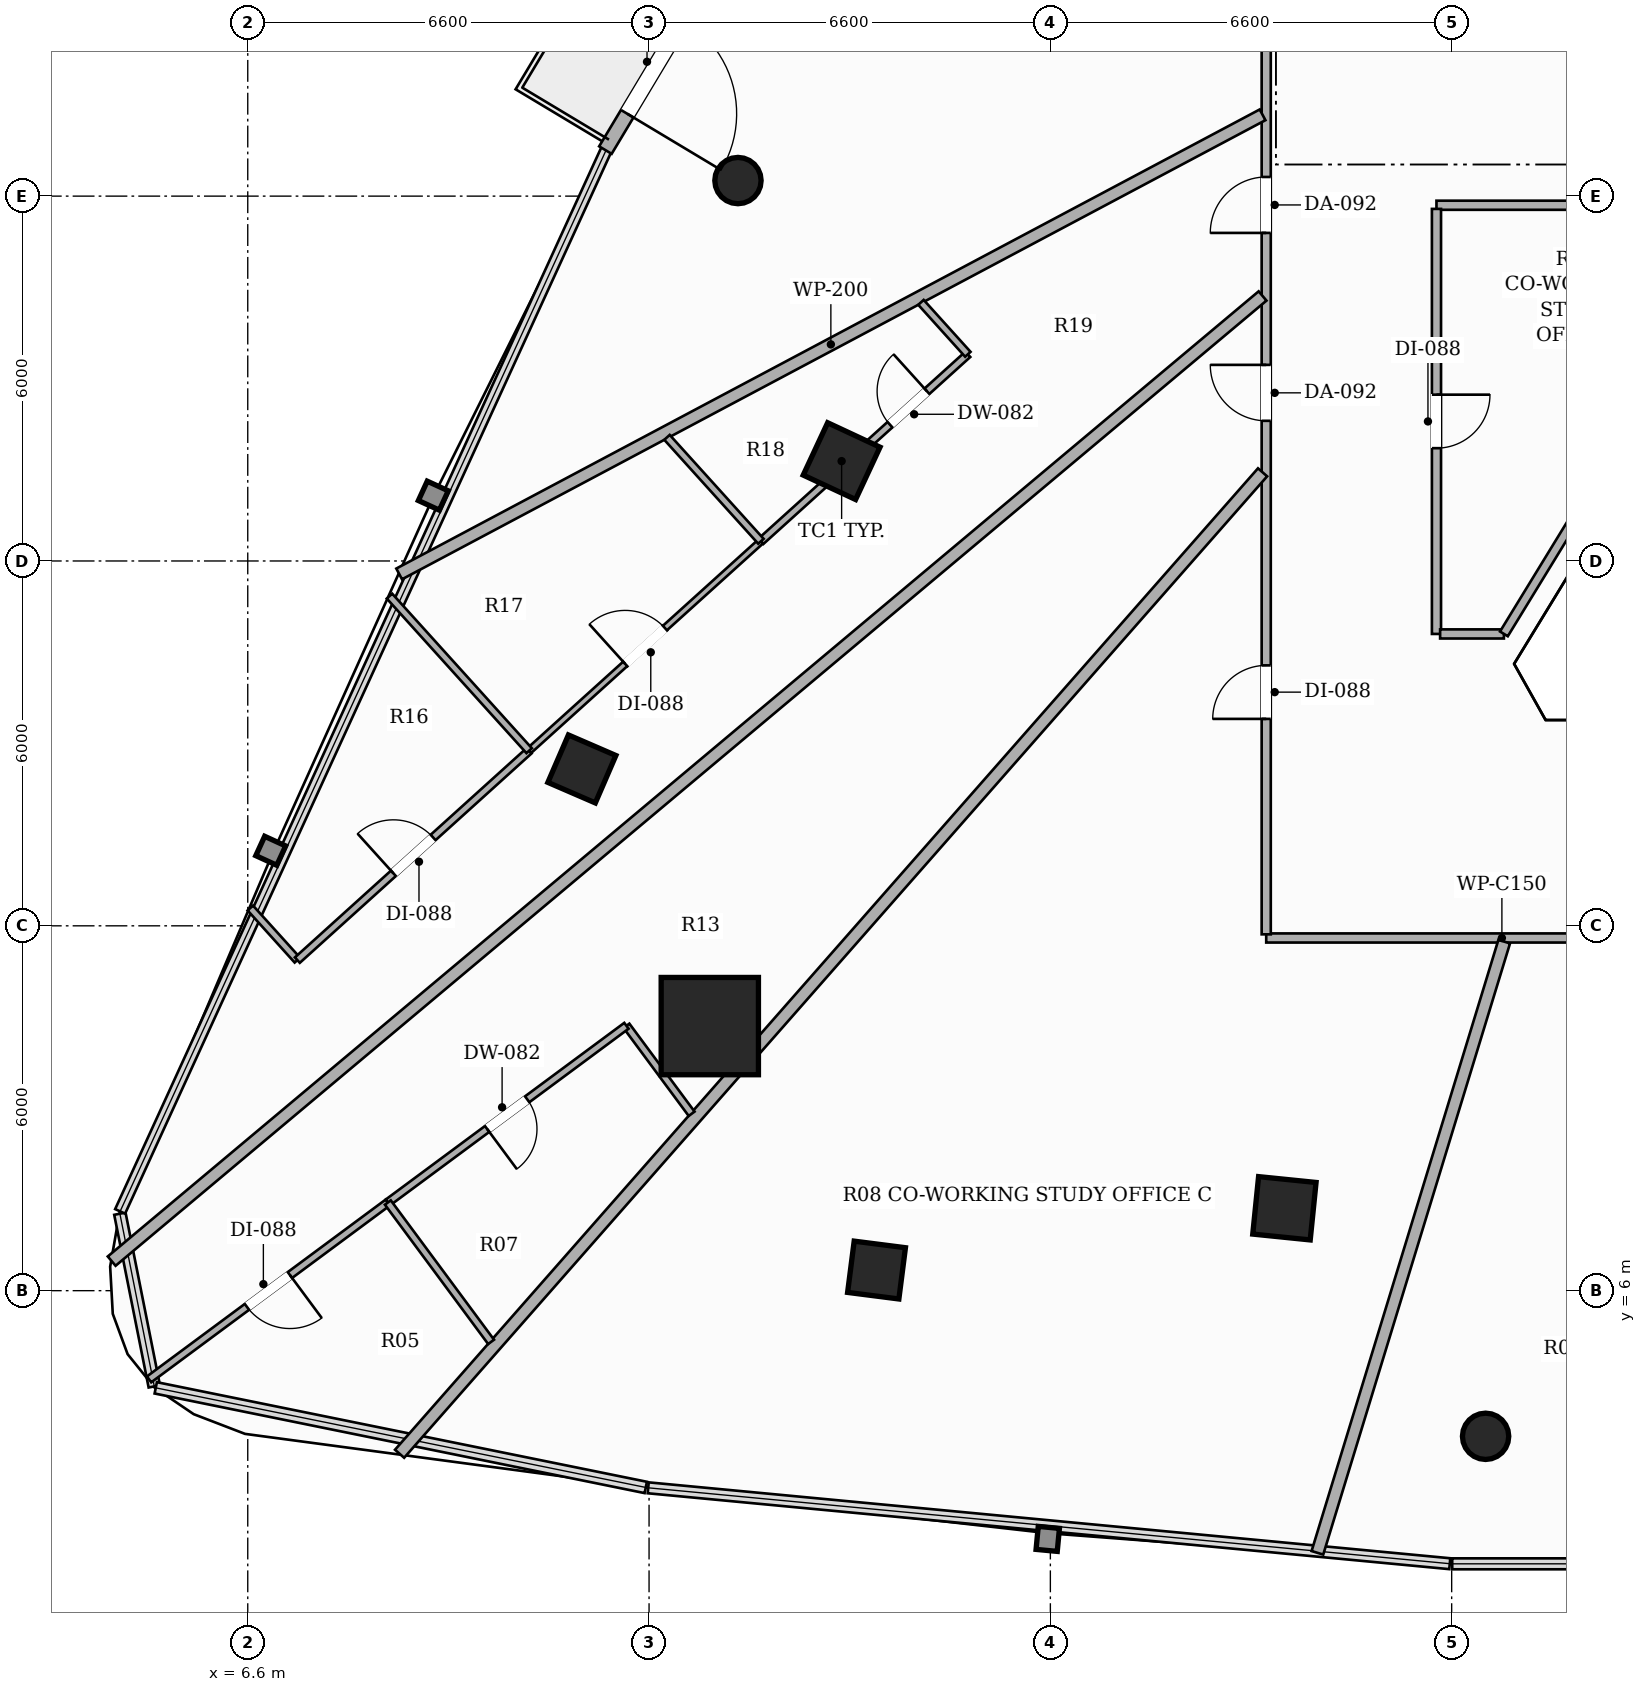
"""IFC4 building model, lengths in metres.
Left out: names, types, materials, properties, quantities, classifications, styles, units other than length and angle.
Written with IfcOpenShell. Run it as: python <this file> out.ifc"""

import sys

from ifc_helpers import new_model, si_unit, direction, frame, frame_2d, origin, origin_2d, place, context, subcontext, project, spatial, rectangle, hollow_rectangle, hollow_circle, extrude, element, fill, save


model = new_model("IFC4")
c1 = context("Model", 3, precision=1e-05, world=origin(), true_north=direction((0.0, 1.0)))
c2 = subcontext(c1, "Body", "Model", "MODEL_VIEW")
j1 = project(units=[si_unit("LENGTHUNIT", "METRE"), si_unit("PLANEANGLEUNIT", "RADIAN")], contexts=[c1])
p1 = place(None, origin())
s1 = spatial("IfcSite", under=j1, at=p1, CompositionType="ELEMENT")
p2 = place(p1, origin())
s2 = spatial("IfcBuilding", under=s1, at=p2, CompositionType="ELEMENT")
p3 = place(p2, frame((0.0, 0.0, 46.7)))
s3 = spatial("IfcBuildingStorey", under=s2, at=p3, CompositionType="ELEMENT", Elevation=46.7)
p4 = place(p3, frame((14.199, 10.351, 0.0), z_axis=(0.0, 0.0, 1.0), x_axis=(1.0, 0.0, 0.0)))
e1 = element("IfcColumn", 1, at=p4, inside=s3, PredefinedType="COLUMN", context=c2, shape_type="SweptSolid", body=[
    extrude(hollow_rectangle(XDim=1.6, YDim=1.6, WallThickness=0.05, at=origin_2d()), origin(), (0.0, 0.0, 1.0), 3.3),
])
for number, where, z_axis, x_axis in (
    (2, (16.367, 19.642, 0.0), (0.0, 0.0, 1.0), (0.423, 0.906, 0.0)),
    (3, (23.649, 7.355, 0.0), (0.0, 0.0, 1.0), (-0.995, 0.101, 0.0)),
):
    element("IfcColumn", number, at=place(p3, frame(where, z_axis=z_axis, x_axis=x_axis)), inside=s3, PredefinedType="COLUMN", context=c2, shape_type="SweptSolid", body=[
        extrude(hollow_rectangle(XDim=0.95, YDim=0.95, WallThickness=0.032, at=origin_2d()), origin(), (0.0, 0.0, 1.0), 3.3),
    ])
for number, where, z_axis, x_axis in (
    (4, (12.095, 14.58, 0.0), (0.0, 0.0, 1.0), (0.397, 0.918, 0.0)),
    (5, (16.941, 6.339, 0.0), (0.0, 0.0, 1.0), (-0.992, 0.127, 0.0)),
):
    element("IfcColumn", number, at=place(p3, frame(where, z_axis=z_axis, x_axis=x_axis)), inside=s3, PredefinedType="COLUMN", context=c2, shape_type="SweptSolid", body=[
        extrude(hollow_rectangle(XDim=0.85, YDim=0.85, WallThickness=0.028, at=origin_2d()), origin(), (0.0, 0.0, 1.0), 3.3),
    ])
for number, where, z_axis, x_axis in (
    (6, (14.662, 24.256, 0.0), (0.0, 0.0, 1.0), (1.0, 0.0, 0.0)),
    (7, (26.958, 3.605, 0.0), (0.0, 0.0, 1.0), (1.0, 0.0, 0.0)),
):
    element("IfcColumn", number, at=place(p3, frame(where, z_axis=z_axis, x_axis=x_axis)), inside=s3, PredefinedType="COLUMN", context=c2, shape_type="SweptSolid", body=[
        extrude(hollow_circle(Radius=0.381, WallThickness=0.022, at=origin_2d()), origin(), (0.0, 0.0, 1.0), 3.3),
    ])
p5 = place(p3, frame((19.162, 35.896, 0.0), z_axis=(0.0, 0.0, 1.0), x_axis=(-0.514316069528, -0.857600711652, 0.0)))
e8 = element("IfcWall", 8, at=p5, inside=s3, PredefinedType="SOLIDWALL", context=c2, shape_type="SweptSolid", body=[
    extrude(rectangle(XDim=12.989, YDim=0.24, at=frame_2d((6.494, 0.0))), origin(), (0.0, 0.0, 1.0), 2.624),
])
p6 = place(p5, frame((10.491, 0.0, 0.0)))
e9 = element("IfcOpeningElement", 9, at=p6, cuts=e8, PredefinedType="OPENING", context=c2, shape_type="SweptSolid", body=[
    extrude(rectangle(XDim=1.8, YDim=2.2, at=frame_2d((0.9, 1.1))), frame((0.0, 0.13, 0.0), z_axis=(0.0, -1.0, 0.0), x_axis=(1.0, 0.0, 0.0)), (0.0, 0.0, 1.0), 0.26),
])
p7 = place(p3, frame((42.59, 11.8, 0.0), z_axis=(0.0, 0.0, 1.0), x_axis=(-1.0, 0.0, 0.0)))
e10 = element("IfcWall", 10, at=p7, inside=s3, PredefinedType="PARTITIONING", context=c2, shape_type="SweptSolid", body=[
    extrude(rectangle(XDim=19.24, YDim=0.15, at=frame_2d((9.62, 0.0))), origin(), (0.0, 0.0, 1.0), 2.669),
])
p8 = place(p7, frame((10.508, 0.0, 0.0)))
e11 = element("IfcOpeningElement", 11, at=p8, cuts=e10, PredefinedType="OPENING", context=c2, shape_type="SweptSolid", body=[
    extrude(rectangle(XDim=0.88, YDim=2.1, at=frame_2d((0.44, 1.05))), frame((0.0, 0.085, 0.0), z_axis=(0.0, -1.0, 0.0), x_axis=(1.0, 0.0, 0.0)), (0.0, 0.0, 1.0), 0.17),
])
p9 = place(p7, frame((2.98, 0.0, 0.0)))
e12 = element("IfcOpeningElement", 12, at=p9, cuts=e10, PredefinedType="OPENING", context=c2, shape_type="SweptSolid", body=[
    extrude(rectangle(XDim=0.92, YDim=2.15, at=frame_2d((0.46, 1.075))), frame((0.0, 0.085, 0.0), z_axis=(0.0, -1.0, 0.0), x_axis=(1.0, 0.0, 0.0)), (0.0, 0.0, 1.0), 0.17),
])
p10 = place(p3, frame((23.35, 11.86, 0.0), z_axis=(0.0, 0.0, 1.0), x_axis=(0.0, 1.0, 0.0)))
e13 = element("IfcWall", 13, at=p10, inside=s3, PredefinedType="PARTITIONING", context=c2, shape_type="SweptSolid", body=[
    extrude(rectangle(XDim=25.04, YDim=0.15, at=frame_2d((12.52, 0.0))), origin(), (0.0, 0.0, 1.0), 2.413),
])
p11 = place(p10, frame((18.67, 0.0, 0.0)))
e14 = element("IfcOpeningElement", 14, at=p11, cuts=e13, PredefinedType="OPENING", context=c2, shape_type="SweptSolid", body=[
    extrude(rectangle(XDim=0.88, YDim=2.1, at=frame_2d((0.44, 1.05))), frame((0.0, 0.085, 0.0), z_axis=(0.0, -1.0, 0.0), x_axis=(1.0, 0.0, 0.0)), (0.0, 0.0, 1.0), 0.17),
])
p12 = place(p10, frame((3.543, 0.0, 0.0)))
e15 = element("IfcOpeningElement", 15, at=p12, cuts=e13, PredefinedType="OPENING", context=c2, shape_type="SweptSolid", body=[
    extrude(rectangle(XDim=0.88, YDim=2.1, at=frame_2d((0.44, 1.05))), frame((0.0, 0.085, 0.0), z_axis=(0.0, -1.0, 0.0), x_axis=(1.0, 0.0, 0.0)), (0.0, 0.0, 1.0), 0.17),
])
p13 = place(p10, frame((8.445, 0.0, 0.0)))
e16 = element("IfcOpeningElement", 16, at=p13, cuts=e13, PredefinedType="OPENING", context=c2, shape_type="SweptSolid", body=[
    extrude(rectangle(XDim=0.92, YDim=2.15, at=frame_2d((0.46, 1.075))), frame((0.0, 0.085, 0.0), z_axis=(0.0, -1.0, 0.0), x_axis=(1.0, 0.0, 0.0)), (0.0, 0.0, 1.0), 0.17),
])
p14 = place(p10, frame((11.535, 0.0, 0.0)))
e17 = element("IfcOpeningElement", 17, at=p14, cuts=e13, PredefinedType="OPENING", context=c2, shape_type="SweptSolid", body=[
    extrude(rectangle(XDim=0.92, YDim=2.15, at=frame_2d((0.46, 1.075))), frame((0.0, 0.085, 0.0), z_axis=(0.0, -1.0, 0.0), x_axis=(1.0, 0.0, 0.0)), (0.0, 0.0, 1.0), 0.17),
])
p15 = place(p3, frame((31.568, 23.85, 0.0), z_axis=(0.0, 0.0, 1.0), x_axis=(-1.0, 0.0, 0.0)))
e18 = element("IfcWall", 18, at=p15, inside=s3, PredefinedType="PARTITIONING", context=c2, shape_type="SweptSolid", body=[
    extrude(rectangle(XDim=5.418, YDim=0.15, at=frame_2d((2.709, 0.0))), origin(), (0.0, 0.0, 1.0), 2.669),
])
p16 = place(p3, frame((26.15, 23.79, 0.0), z_axis=(0.0, 0.0, 1.0), x_axis=(0.0, -1.0, 0.0)))
e19 = element("IfcWall", 19, at=p16, inside=s3, PredefinedType="PARTITIONING", context=c2, shape_type="SweptSolid", body=[
    extrude(rectangle(XDim=6.99, YDim=0.15, at=frame_2d((3.495, 0.0))), origin(), (0.0, 0.0, 1.0), 2.669),
])
p17 = place(p16, frame((3.055, 0.0, 0.0)))
e20 = element("IfcOpeningElement", 20, at=p17, cuts=e19, PredefinedType="OPENING", context=c2, shape_type="SweptSolid", body=[
    extrude(rectangle(XDim=0.88, YDim=2.1, at=frame_2d((0.44, 1.05))), frame((0.0, 0.085, 0.0), z_axis=(0.0, -1.0, 0.0), x_axis=(1.0, 0.0, 0.0)), (0.0, 0.0, 1.0), 0.17),
])
p18 = place(p3, frame((26.21, 16.8, 0.0), z_axis=(0.0, 0.0, 1.0), x_axis=(1.0, 0.0, 0.0)))
e21 = element("IfcWall", 21, at=p18, inside=s3, PredefinedType="PARTITIONING", context=c2, shape_type="SweptSolid", body=[
    extrude(rectangle(XDim=1.049, YDim=0.15, at=frame_2d((0.524, 0.0))), origin(), (0.0, 0.0, 1.0), 3.06),
])
p19 = place(p3, frame((27.259, 16.801, 0.0), z_axis=(0.0, 0.0, 1.0), x_axis=(0.522072924527, 0.852900850906, 0.0)))
e22 = element("IfcWall", 22, at=p19, inside=s3, PredefinedType="PARTITIONING", context=c2, shape_type="SweptSolid", body=[
    extrude(rectangle(XDim=8.194, YDim=0.15, at=frame_2d((4.097, 0.0))), origin(), (0.0, 0.0, 1.0), 2.669),
])
p20 = place(p3, frame((23.29, 25.337, 0.0), z_axis=(0.0, 0.0, 1.0), x_axis=(-0.882959018112, -0.469450074379, 0.0)))
e23 = element("IfcWall", 23, at=p20, inside=s3, PredefinedType="PARTITIONING", context=c2, shape_type="SweptSolid", body=[
    extrude(rectangle(XDim=16.082, YDim=0.2, at=frame_2d((8.041, 0.0))), origin(), (0.0, 0.0, 1.0), 2.413),
])
p21 = place(p3, frame((27.264, 11.74, 0.0), z_axis=(0.0, 0.0, 1.0), x_axis=(-0.292294665238, -0.956328305904, 0.0)))
e24 = element("IfcWall", 24, at=p21, inside=s3, PredefinedType="PARTITIONING", context=c2, shape_type="SweptSolid", body=[
    extrude(rectangle(XDim=10.51, YDim=0.2, at=frame_2d((5.255, 0.0))), origin(), (0.0, 0.0, 1.0), 2.413),
])
p22 = place(p3, frame((9.097, 3.318, 0.0), z_axis=(0.0, 0.0, 1.0), x_axis=(0.66036589704, 0.750943993935, 0.0)))
e25 = element("IfcWall", 25, at=p22, inside=s3, PredefinedType="PARTITIONING", context=c2, shape_type="SweptSolid", body=[
    extrude(rectangle(XDim=21.493, YDim=0.2, at=frame_2d((10.747, 0.0))), origin(), (0.0, 0.0, 1.0), 2.413),
])
p23 = place(p3, frame((4.362, 6.486, 0.0), z_axis=(0.0, 0.0, 1.0), x_axis=(0.766256370513, 0.642534959865, 0.0)))
e26 = element("IfcWall", 26, at=p23, inside=s3, PredefinedType="PARTITIONING", context=c2, shape_type="SweptSolid", body=[
    extrude(rectangle(XDim=24.702, YDim=0.2, at=frame_2d((12.351, 0.0))), origin(), (0.0, 0.0, 1.0), 2.413),
])
p24 = place(p3, frame((13.9, 8.909, 0.0), z_axis=(0.0, 0.0, 1.0), x_axis=(-0.595282665334, 0.803516364708, 0.0)))
e27 = element("IfcWall", 27, at=p24, inside=s3, PredefinedType="PARTITIONING", context=c2, shape_type="SweptSolid", body=[
    extrude(rectangle(XDim=1.801, YDim=0.12, at=frame_2d((0.9, 0.0))), origin(), (0.0, 0.0, 1.0), 3.06),
])
p25 = place(p3, frame((12.828, 10.356, 0.0), z_axis=(0.0, 0.0, 1.0), x_axis=(-0.803609449498, -0.595156998344, 0.0)))
e28 = element("IfcWall", 28, at=p25, inside=s3, PredefinedType="PARTITIONING", context=c2, shape_type="SweptSolid", body=[
    extrude(rectangle(XDim=4.883, YDim=0.12, at=frame_2d((2.441, 0.0))), origin(), (0.0, 0.0, 1.0), 2.619),
])
p26 = place(p25, frame((2.031, 0.0, 0.0)))
e29 = element("IfcOpeningElement", 29, at=p26, cuts=e28, PredefinedType="OPENING", context=c2, shape_type="SweptSolid", body=[
    extrude(rectangle(XDim=0.82, YDim=2.1, at=frame_2d((0.41, 1.05))), frame((0.0, 0.07, 0.0), z_axis=(0.0, -1.0, 0.0), x_axis=(1.0, 0.0, 0.0)), (0.0, 0.0, 1.0), 0.14),
])
p27 = place(p3, frame((8.904, 7.45, 0.0), z_axis=(0.0, 0.0, 1.0), x_axis=(-0.803552768464, -0.595233524168, 0.0)))
e30 = element("IfcWall", 30, at=p27, inside=s3, PredefinedType="PARTITIONING", context=c2, shape_type="SweptSolid", body=[
    extrude(rectangle(XDim=4.887, YDim=0.12, at=frame_2d((2.443, 0.0))), origin(), (0.0, 0.0, 1.0), 3.06),
])
p28 = place(p27, frame((2.004, 0.0, 0.0)))
e31 = element("IfcOpeningElement", 31, at=p28, cuts=e30, PredefinedType="OPENING", context=c2, shape_type="SweptSolid", body=[
    extrude(rectangle(XDim=0.88, YDim=2.1, at=frame_2d((0.44, 1.05))), frame((0.0, 0.07, 0.0), z_axis=(0.0, -1.0, 0.0), x_axis=(1.0, 0.0, 0.0)), (0.0, 0.0, 1.0), 0.14),
])
p29 = place(p3, frame((10.602, 5.158, 0.0), z_axis=(0.0, 0.0, 1.0), x_axis=(-0.595278721497, 0.803519286472, 0.0)))
e32 = element("IfcWall", 32, at=p29, inside=s3, PredefinedType="PARTITIONING", context=c2, shape_type="SweptSolid", body=[
    extrude(rectangle(XDim=2.853, YDim=0.12, at=frame_2d((1.426, 0.0))), origin(), (0.0, 0.0, 1.0), 3.06),
])
p30 = place(p3, frame((15.04, 18.324, 0.0), z_axis=(0.0, 0.0, 1.0), x_axis=(0.741971948415, 0.670430926916, 0.0)))
e33 = element("IfcWall", 33, at=p30, inside=s3, PredefinedType="PARTITIONING", context=c2, shape_type="SweptSolid", body=[
    extrude(rectangle(XDim=4.586, YDim=0.12, at=frame_2d((2.293, 0.0))), origin(), (0.0, 0.0, 1.0), 2.413),
])
p31 = place(p30, frame((2.86, 0.0, 0.0)))
e34 = element("IfcOpeningElement", 34, at=p31, cuts=e33, PredefinedType="OPENING", context=c2, shape_type="SweptSolid", body=[
    extrude(rectangle(XDim=0.82, YDim=2.1, at=frame_2d((0.41, 1.05))), frame((0.0, 0.07, 0.0), z_axis=(0.0, -1.0, 0.0), x_axis=(1.0, 0.0, 0.0)), (0.0, 0.0, 1.0), 0.14),
])
p32 = place(p3, frame((18.443, 21.399, 0.0), z_axis=(0.0, 0.0, 1.0), x_axis=(-0.670112835353, 0.742259245746, 0.0)))
e35 = element("IfcWall", 35, at=p32, inside=s3, PredefinedType="PARTITIONING", context=c2, shape_type="SweptSolid", body=[
    extrude(rectangle(XDim=1.151, YDim=0.12, at=frame_2d((0.575, 0.0))), origin(), (0.0, 0.0, 1.0), 2.669),
])
p33 = place(p3, frame((6.642, 12.293, 0.0), z_axis=(0.0, 0.0, 1.0), x_axis=(0.670248695606, -0.742136568321, 0.0)))
e36 = element("IfcWall", 36, at=p33, inside=s3, PredefinedType="PARTITIONING", context=c2, shape_type="SweptSolid", body=[
    extrude(rectangle(XDim=1.155, YDim=0.12, at=frame_2d((0.577, 0.0))), origin(), (0.0, 0.0, 1.0), 2.619),
])
p34 = place(p3, frame((7.416, 11.436, 0.0), z_axis=(0.0, 0.0, 1.0), x_axis=(0.742030958457, 0.670365614192, 0.0)))
e37 = element("IfcWall", 37, at=p34, inside=s3, PredefinedType="PARTITIONING", context=c2, shape_type="SweptSolid", body=[
    extrude(rectangle(XDim=5.137, YDim=0.12, at=frame_2d((2.569, 0.0))), origin(), (0.0, 0.0, 1.0), 2.619),
])
p35 = place(p34, frame((2.129, 0.0, 0.0)))
e38 = element("IfcOpeningElement", 38, at=p35, cuts=e37, PredefinedType="OPENING", context=c2, shape_type="SweptSolid", body=[
    extrude(rectangle(XDim=0.88, YDim=2.1, at=frame_2d((0.44, 1.05))), frame((0.0, 0.07, 0.0), z_axis=(0.0, -1.0, 0.0), x_axis=(1.0, 0.0, 0.0)), (0.0, 0.0, 1.0), 0.14),
])
p36 = place(p3, frame((11.228, 14.88, 0.0), z_axis=(0.0, 0.0, 1.0), x_axis=(0.742007319068, 0.670391779819, 0.0)))
e39 = element("IfcWall", 39, at=p36, inside=s3, PredefinedType="PARTITIONING", context=c2, shape_type="SweptSolid", body=[
    extrude(rectangle(XDim=5.137, YDim=0.1, at=frame_2d((2.569, 0.0))), origin(), (0.0, 0.0, 1.0), 2.413),
])
p37 = place(p36, frame((2.129, 0.0, 0.0)))
e40 = element("IfcOpeningElement", 40, at=p37, cuts=e39, PredefinedType="OPENING", context=c2, shape_type="SweptSolid", body=[
    extrude(rectangle(XDim=0.88, YDim=2.1, at=frame_2d((0.44, 1.05))), frame((0.0, 0.06, 0.0), z_axis=(0.0, -1.0, 0.0), x_axis=(1.0, 0.0, 0.0)), (0.0, 0.0, 1.0), 0.12),
])
p38 = place(p3, frame((15.04, 18.324, 0.0), z_axis=(0.0, 0.0, 1.0), x_axis=(-0.670602478911, 0.741816901451, 0.0)))
e41 = element("IfcWall", 41, at=p38, inside=s3, PredefinedType="PARTITIONING", context=c2, shape_type="SweptSolid", body=[
    extrude(rectangle(XDim=2.304, YDim=0.12, at=frame_2d((1.152, 0.0))), origin(), (0.0, 0.0, 1.0), 2.413),
])
p39 = place(p3, frame((8.931, 17.422, 0.0), z_axis=(0.0, 0.0, 1.0), x_axis=(0.670431816202, -0.741971144873, 0.0)))
e42 = element("IfcWall", 42, at=p39, inside=s3, PredefinedType="PARTITIONING", context=c2, shape_type="SweptSolid", body=[
    extrude(rectangle(XDim=3.426, YDim=0.12, at=frame_2d((1.713, 0.0))), origin(), (0.0, 0.0, 1.0), 3.06),
])
p40 = place(p6, origin())
e43 = element("IfcDoor", 43, at=p40, inside=s3, OperationType="SINGLE_SWING_RIGHT", PredefinedType="DOOR", context=c2, shape_type="SweptSolid", body=[
    extrude(rectangle(XDim=1.8, YDim=2.2, at=frame_2d((0.9, 1.1))), frame((0.0, 0.025, 0.0), z_axis=(0.0, -1.0, 0.0), x_axis=(1.0, 0.0, 0.0)), (0.0, 0.0, 1.0), 0.05),
])
fill(e9, e43)
p41 = place(p12, origin())
e44 = element("IfcDoor", 44, at=p41, inside=s3, OperationType="SINGLE_SWING_LEFT", PredefinedType="DOOR", context=c2, shape_type="SweptSolid", body=[
    extrude(rectangle(XDim=0.88, YDim=2.1, at=frame_2d((0.44, 1.05))), frame((0.0, 0.025, 0.0), z_axis=(0.0, -1.0, 0.0), x_axis=(1.0, 0.0, 0.0)), (0.0, 0.0, 1.0), 0.05),
])
fill(e15, e44)
p42 = place(p13, origin())
e45 = element("IfcDoor", 45, at=p42, inside=s3, OperationType="SINGLE_SWING_RIGHT", PredefinedType="DOOR", context=c2, shape_type="SweptSolid", body=[
    extrude(rectangle(XDim=0.92, YDim=2.15, at=frame_2d((0.46, 1.075))), frame((0.0, 0.025, 0.0), z_axis=(0.0, -1.0, 0.0), x_axis=(1.0, 0.0, 0.0)), (0.0, 0.0, 1.0), 0.05),
])
fill(e16, e45)
p43 = place(p26, origin())
e46 = element("IfcDoor", 46, at=p43, inside=s3, OperationType="SINGLE_SWING_RIGHT", PredefinedType="DOOR", context=c2, shape_type="SweptSolid", body=[
    extrude(rectangle(XDim=0.82, YDim=2.1, at=frame_2d((0.41, 1.05))), frame((0.0, 0.025, 0.0), z_axis=(0.0, -1.0, 0.0), x_axis=(1.0, 0.0, 0.0)), (0.0, 0.0, 1.0), 0.05),
])
fill(e29, e46)
p44 = place(p28, origin())
e47 = element("IfcDoor", 47, at=p44, inside=s3, OperationType="SINGLE_SWING_LEFT", PredefinedType="DOOR", context=c2, shape_type="SweptSolid", body=[
    extrude(rectangle(XDim=0.88, YDim=2.1, at=frame_2d((0.44, 1.05))), frame((0.0, 0.025, 0.0), z_axis=(0.0, -1.0, 0.0), x_axis=(1.0, 0.0, 0.0)), (0.0, 0.0, 1.0), 0.05),
])
fill(e31, e47)
p45 = place(p14, origin())
e48 = element("IfcDoor", 48, at=p45, inside=s3, OperationType="SINGLE_SWING_LEFT", PredefinedType="DOOR", context=c2, shape_type="SweptSolid", body=[
    extrude(rectangle(XDim=0.92, YDim=2.15, at=frame_2d((0.46, 1.075))), frame((0.0, 0.025, 0.0), z_axis=(0.0, -1.0, 0.0), x_axis=(1.0, 0.0, 0.0)), (0.0, 0.0, 1.0), 0.05),
])
fill(e17, e48)
p46 = place(p31, origin())
e49 = element("IfcDoor", 49, at=p46, inside=s3, OperationType="SINGLE_SWING_RIGHT", PredefinedType="DOOR", context=c2, shape_type="SweptSolid", body=[
    extrude(rectangle(XDim=0.82, YDim=2.1, at=frame_2d((0.41, 1.05))), frame((0.0, 0.025, 0.0), z_axis=(0.0, -1.0, 0.0), x_axis=(1.0, 0.0, 0.0)), (0.0, 0.0, 1.0), 0.05),
])
fill(e34, e49)
p47 = place(p35, origin())
e50 = element("IfcDoor", 50, at=p47, inside=s3, OperationType="SINGLE_SWING_LEFT", PredefinedType="DOOR", context=c2, shape_type="SweptSolid", body=[
    extrude(rectangle(XDim=0.88, YDim=2.1, at=frame_2d((0.44, 1.05))), frame((0.0, 0.025, 0.0), z_axis=(0.0, -1.0, 0.0), x_axis=(1.0, 0.0, 0.0)), (0.0, 0.0, 1.0), 0.05),
])
fill(e38, e50)
p48 = place(p37, origin())
e51 = element("IfcDoor", 51, at=p48, inside=s3, OperationType="SINGLE_SWING_LEFT", PredefinedType="DOOR", context=c2, shape_type="SweptSolid", body=[
    extrude(rectangle(XDim=0.88, YDim=2.1, at=frame_2d((0.44, 1.05))), frame((0.0, 0.025, 0.0), z_axis=(0.0, -1.0, 0.0), x_axis=(1.0, 0.0, 0.0)), (0.0, 0.0, 1.0), 0.05),
])
fill(e40, e51)
p49 = place(p17, origin())
e52 = element("IfcDoor", 52, at=p49, inside=s3, OperationType="SINGLE_SWING_LEFT", PredefinedType="DOOR", context=c2, shape_type="SweptSolid", body=[
    extrude(rectangle(XDim=0.88, YDim=2.1, at=frame_2d((0.44, 1.05))), frame((0.0, 0.025, 0.0), z_axis=(0.0, -1.0, 0.0), x_axis=(1.0, 0.0, 0.0)), (0.0, 0.0, 1.0), 0.05),
])
fill(e20, e52)
save(model, sys.argv[1])
